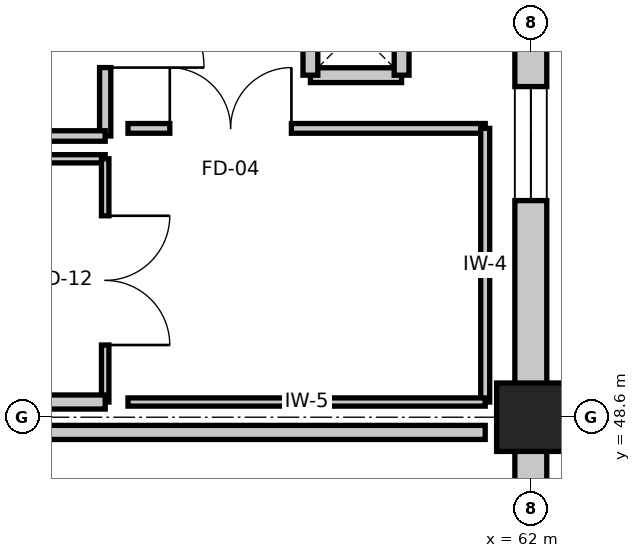
"""IFC4 building model, lengths in metres.
Left out: names, types, materials, properties, quantities, classifications, styles, units other than length and angle.
Written with IfcOpenShell. Run it as: python <this file> out.ifc"""

import sys

from ifc_helpers import new_model, si_unit, direction, frame, frame_2d, origin, origin_2d, place, context, subcontext, project, spatial, rectangle, extrude, element, fill, save


model = new_model("IFC4")
c1 = context("Model", 3, precision=1e-05, world=origin(), true_north=direction((0.0, 1.0)))
c2 = subcontext(c1, "Body", "Model", "MODEL_VIEW")
j1 = project(units=[si_unit("LENGTHUNIT", "METRE"), si_unit("PLANEANGLEUNIT", "RADIAN")], contexts=[c1])
p1 = place(None, origin())
s1 = spatial("IfcSite", under=j1, at=p1, CompositionType="ELEMENT")
p2 = place(p1, origin())
s2 = spatial("IfcBuilding", under=s1, at=p2, CompositionType="ELEMENT")
p3 = place(p2, origin())
s3 = spatial("IfcBuildingStorey", under=s2, at=p3, CompositionType="ELEMENT", Elevation=0.0)
p4 = place(p3, frame((62.0, 48.6, 0.0), z_axis=(0.0, 0.0, 1.0), x_axis=(1.0, 0.0, 0.0)))
e1 = element("IfcColumn", 1, at=p4, inside=s3, PredefinedType="COLUMN", context=c2, shape_type="SweptSolid", body=[
    extrude(rectangle(XDim=0.9, YDim=0.9, at=origin_2d()), origin(), (0.0, 0.0, 1.0), 5.4),
])
p5 = place(p3, frame((62.0, 55.8, 0.0), z_axis=(0.0, 0.0, 1.0), x_axis=(0.0, -1.0, 0.0)))
e2 = element("IfcWall", 2, at=p5, inside=s3, PredefinedType="STANDARD", context=c2, shape_type="SweptSolid", body=[
    extrude(rectangle(XDim=7.2, YDim=0.42, at=frame_2d((3.6, 0.0))), origin(), (0.0, 0.0, 1.0), 4.625),
])
p6 = place(p5, frame((2.85, 0.0, 0.9)))
e3 = element("IfcOpeningElement", 3, at=p6, cuts=e2, PredefinedType="OPENING", context=c2, shape_type="SweptSolid", body=[
    extrude(rectangle(XDim=1.5, YDim=1.5, at=frame_2d((0.75, 0.75))), frame((0.0, 0.22, 0.0), z_axis=(0.0, -1.0, 0.0), x_axis=(1.0, 0.0, 0.0)), (0.0, 0.0, 1.0), 0.44),
])
p7 = place(p3, frame((62.0, 48.6, 0.0), z_axis=(0.0, 0.0, 1.0), x_axis=(0.0, -1.0, 0.0)))
e4 = element("IfcWall", 4, at=p7, inside=s3, PredefinedType="STANDARD", context=c2, shape_type="SweptSolid", body=[
    extrude(rectangle(XDim=7.2, YDim=0.42, at=frame_2d((3.6, 0.0))), origin(), (0.0, 0.0, 1.0), 3.848),
])
for number, where, z_axis, x_axis in (
    (5, (59.1, 53.1, 0.0), (0.0, 0.0, 1.0), (1.0, 0.0, 0.0)),
    (6, (60.3, 53.1, 0.0), (0.0, 0.0, 1.0), (0.0, 1.0, 0.0)),
    (7, (59.1, 54.3, 0.0), (0.0, 0.0, 1.0), (0.0, -1.0, 0.0)),
):
    element("IfcWall", number, at=place(p3, frame(where, z_axis=z_axis, x_axis=x_axis)), inside=s3, PredefinedType="PARAPET", context=c2, shape_type="SweptSolid", body=[
        extrude(rectangle(XDim=1.2, YDim=0.195, at=frame_2d((0.6, 0.0))), origin(), (0.0, 0.0, 1.0), 5.1),
    ])
p8 = place(p3, frame((18.26, 48.4, 0.0), z_axis=(0.0, 0.0, 1.0), x_axis=(1.0, 0.0, 0.0)))
e8 = element("IfcWall", 8, at=p8, inside=s3, PredefinedType="PARTITIONING", context=c2, shape_type="SweptSolid", body=[
    extrude(rectangle(XDim=43.14, YDim=0.185, at=frame_2d((21.57, 0.0))), origin(), (0.0, 0.0, 1.0), 2.367),
])
p9 = place(p8, frame((19.595, 0.0, 0.0)))
e9 = element("IfcOpeningElement", 9, at=p9, cuts=e8, PredefinedType="OPENING", context=c2, shape_type="SweptSolid", body=[
    extrude(rectangle(XDim=0.95, YDim=2.1, at=frame_2d((0.475, 1.05))), frame((0.0, 0.103, 0.0), z_axis=(0.0, -1.0, 0.0), x_axis=(1.0, 0.0, 0.0)), (0.0, 0.0, 1.0), 0.205),
])
p10 = place(p3, frame((52.35, 52.0, 0.0), z_axis=(0.0, 0.0, 1.0), x_axis=(1.0, 0.0, 0.0)))
e10 = element("IfcWall", 10, at=p10, inside=s3, PredefinedType="PARTITIONING", context=c2, shape_type="SweptSolid", body=[
    extrude(rectangle(XDim=4.05, YDim=0.108, at=frame_2d((2.025, 0.0))), origin(), (0.0, 0.0, 1.0), 4.548),
])
p11 = place(p3, frame((56.4, 52.0, 0.0), z_axis=(0.0, 0.0, 1.0), x_axis=(0.0, -1.0, 0.0)))
e11 = element("IfcWall", 11, at=p11, inside=s3, PredefinedType="PARTITIONING", context=c2, shape_type="SweptSolid", body=[
    extrude(rectangle(XDim=3.2, YDim=0.098, at=frame_2d((1.6, 0.0))), origin(), (0.0, 0.0, 1.0), 5.1),
])
p12 = place(p11, frame((0.75, 0.0, 0.0)))
e12 = element("IfcOpeningElement", 12, at=p12, cuts=e11, PredefinedType="OPENING", context=c2, shape_type="SweptSolid", body=[
    extrude(rectangle(XDim=1.7, YDim=2.25, at=frame_2d((0.85, 1.125))), frame((0.0, 0.059, 0.0), z_axis=(0.0, -1.0, 0.0), x_axis=(1.0, 0.0, 0.0)), (0.0, 0.0, 1.0), 0.118),
])
p13 = place(p3, frame((56.4, 48.8, 0.0), z_axis=(0.0, 0.0, 1.0), x_axis=(-1.0, 0.0, 0.0)))
e13 = element("IfcWall", 13, at=p13, inside=s3, PredefinedType="PARTITIONING", context=c2, shape_type="SweptSolid", body=[
    extrude(rectangle(XDim=5.0, YDim=0.185, at=frame_2d((2.5, 0.0))), origin(), (0.0, 0.0, 1.0), 4.473),
])
p14 = place(p3, frame((56.4, 55.4, 0.0), z_axis=(0.0, 0.0, 1.0), x_axis=(0.0, -1.0, 0.0)))
e14 = element("IfcWall", 14, at=p14, inside=s3, PredefinedType="PARTITIONING", context=c2, shape_type="SweptSolid", body=[
    extrude(rectangle(XDim=3.1, YDim=0.148, at=frame_2d((1.55, 0.0))), origin(), (0.0, 0.0, 1.0), 4.727),
])
p15 = place(p14, frame((0.9, 0.0, 0.0)))
e15 = element("IfcOpeningElement", 15, at=p15, cuts=e14, PredefinedType="OPENING", context=c2, shape_type="SweptSolid", body=[
    extrude(rectangle(XDim=1.3, YDim=2.15, at=frame_2d((0.65, 1.075))), frame((0.0, 0.084, 0.0), z_axis=(0.0, -1.0, 0.0), x_axis=(1.0, 0.0, 0.0)), (0.0, 0.0, 1.0), 0.168),
])
p16 = place(p3, frame((56.4, 52.3, 0.0), z_axis=(0.0, 0.0, 1.0), x_axis=(-1.0, 0.0, 0.0)))
e16 = element("IfcWall", 16, at=p16, inside=s3, PredefinedType="PARTITIONING", context=c2, shape_type="SweptSolid", body=[
    extrude(rectangle(XDim=4.05, YDim=0.138, at=frame_2d((2.025, 0.0))), origin(), (0.0, 0.0, 1.0), 4.548),
])
p17 = place(p3, frame((56.7, 52.4, 0.0), z_axis=(0.0, 0.0, 1.0), x_axis=(1.0, 0.0, 0.0)))
e17 = element("IfcWall", 17, at=p17, inside=s3, PredefinedType="PARTITIONING", context=c2, shape_type="SweptSolid", body=[
    extrude(rectangle(XDim=4.7, YDim=0.128, at=frame_2d((2.35, 0.0))), origin(), (0.0, 0.0, 1.0), 5.1),
])
p18 = place(p17, frame((0.55, 0.0, 0.0)))
e18 = element("IfcOpeningElement", 18, at=p18, cuts=e17, PredefinedType="OPENING", context=c2, shape_type="SweptSolid", body=[
    extrude(rectangle(XDim=1.6, YDim=2.15, at=frame_2d((0.8, 1.075))), frame((0.0, 0.074, 0.0), z_axis=(0.0, -1.0, 0.0), x_axis=(1.0, 0.0, 0.0)), (0.0, 0.0, 1.0), 0.148),
])
p19 = place(p3, frame((61.4, 52.4, 0.0), z_axis=(0.0, 0.0, 1.0), x_axis=(0.0, -1.0, 0.0)))
e19 = element("IfcWall", 19, at=p19, inside=s3, PredefinedType="PARTITIONING", context=c2, shape_type="SweptSolid", body=[
    extrude(rectangle(XDim=3.6, YDim=0.118, at=frame_2d((1.8, 0.0))), origin(), (0.0, 0.0, 1.0), 4.727),
])
p20 = place(p3, frame((61.4, 48.8, 0.0), z_axis=(0.0, 0.0, 1.0), x_axis=(-1.0, 0.0, 0.0)))
e20 = element("IfcWall", 20, at=p20, inside=s3, PredefinedType="PARTITIONING", context=c2, shape_type="SweptSolid", body=[
    extrude(rectangle(XDim=4.7, YDim=0.108, at=frame_2d((2.35, 0.0))), origin(), (0.0, 0.0, 1.0), 4.473),
])
p21 = place(p6, origin())
e21 = element("IfcWindow", 21, at=p21, inside=s3, PartitioningType="SINGLE_PANEL", PredefinedType="WINDOW", context=c2, shape_type="SweptSolid", body=[
    extrude(rectangle(XDim=1.5, YDim=1.5, at=frame_2d((0.75, 0.75))), frame((0.0, 0.03, 0.0), z_axis=(0.0, -1.0, 0.0), x_axis=(1.0, 0.0, 0.0)), (0.0, 0.0, 1.0), 0.06),
])
fill(e3, e21)
p22 = place(p12, origin())
e22 = element("IfcDoor", 22, at=p22, inside=s3, OperationType="DOUBLE_DOOR_SINGLE_SWING", PredefinedType="DOOR", context=c2, shape_type="SweptSolid", body=[
    extrude(rectangle(XDim=1.7, YDim=2.25, at=frame_2d((0.85, 1.125))), frame((0.0, 0.025, 0.0), z_axis=(0.0, -1.0, 0.0), x_axis=(1.0, 0.0, 0.0)), (0.0, 0.0, 1.0), 0.05),
])
fill(e12, e22)
p23 = place(p15, origin())
e23 = element("IfcDoor", 23, at=p23, inside=s3, OperationType="SINGLE_SWING_RIGHT", PredefinedType="DOOR", context=c2, shape_type="SweptSolid", body=[
    extrude(rectangle(XDim=1.3, YDim=2.15, at=frame_2d((0.65, 1.075))), frame((0.0, 0.025, 0.0), z_axis=(0.0, -1.0, 0.0), x_axis=(1.0, 0.0, 0.0)), (0.0, 0.0, 1.0), 0.05),
])
fill(e15, e23)
p24 = place(p18, origin())
e24 = element("IfcDoor", 24, at=p24, inside=s3, OperationType="DOUBLE_DOOR_SINGLE_SWING", PredefinedType="DOOR", context=c2, shape_type="SweptSolid", body=[
    extrude(rectangle(XDim=1.6, YDim=2.15, at=frame_2d((0.8, 1.075))), frame((0.0, 0.025, 0.0), z_axis=(0.0, -1.0, 0.0), x_axis=(1.0, 0.0, 0.0)), (0.0, 0.0, 1.0), 0.05),
])
fill(e18, e24)
save(model, sys.argv[1])
